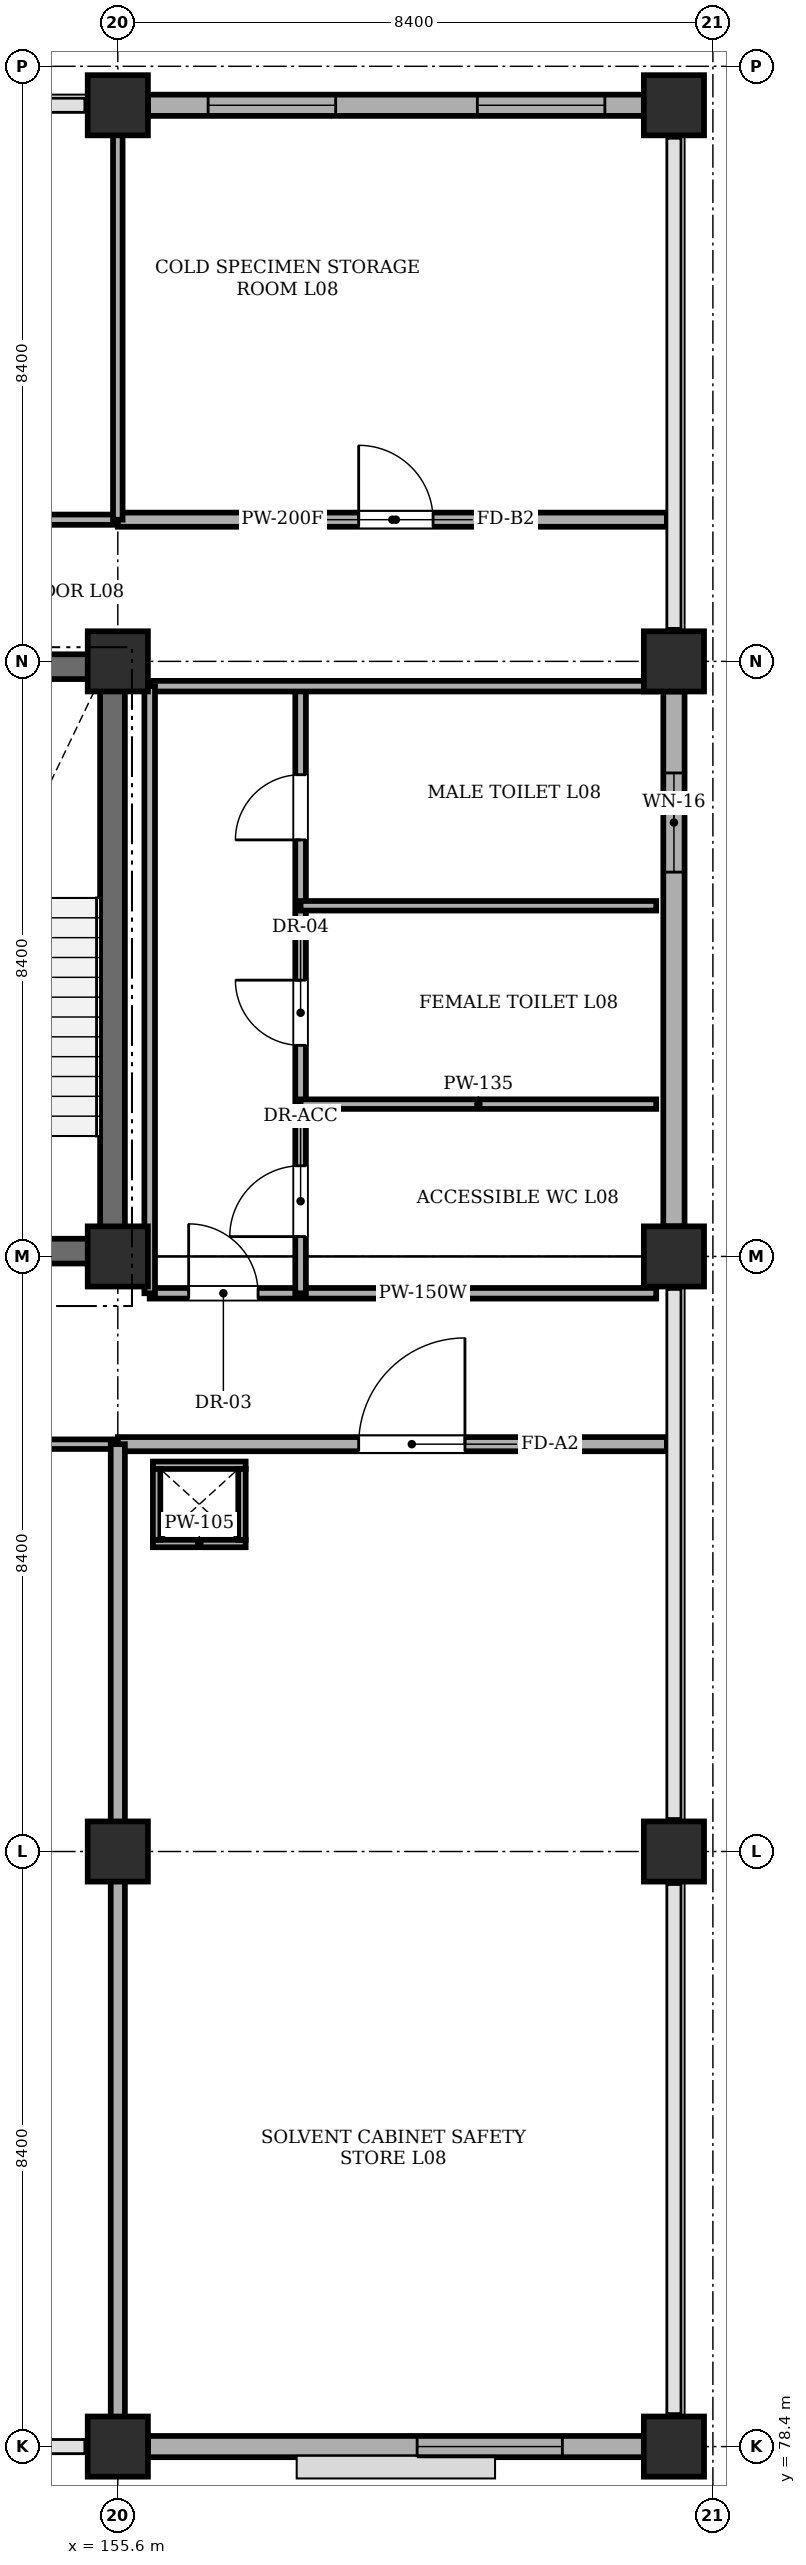
"""IFC4 building model, lengths in metres.
Left out: names, types, materials, properties, quantities, classifications, styles, units other than length and angle.
Written with IfcOpenShell. Run it as: python <this file> out.ifc"""

import sys

from ifc_helpers import new_model, si_unit, direction, frame, frame_2d, origin, origin_2d, place, context, subcontext, project, spatial, rectangle, extrude, element, fill, save


model = new_model("IFC4")
c1 = context("Model", 3, precision=1e-05, world=origin(), true_north=direction((0.0, 1.0)))
c2 = subcontext(c1, "Body", "Model", "MODEL_VIEW")
j1 = project(units=[si_unit("LENGTHUNIT", "METRE"), si_unit("PLANEANGLEUNIT", "RADIAN")], contexts=[c1])
p1 = place(None, origin())
s1 = spatial("IfcSite", under=j1, at=p1, CompositionType="ELEMENT")
p2 = place(p1, origin())
s2 = spatial("IfcBuilding", under=s1, at=p2, CompositionType="ELEMENT")
p3 = place(p2, frame((0.0, 0.0, 31.8)))
s3 = spatial("IfcBuildingStorey", under=s2, at=p3, CompositionType="ELEMENT", Elevation=31.8)
for number, where, z_axis, x_axis in (
    (1, (155.6, 78.4, 0.0), (0.0, 0.0, 1.0), (1.0, 0.0, 0.0)),
    (2, (155.6, 86.8, 0.0), (0.0, 0.0, 1.0), (1.0, 0.0, 0.0)),
    (3, (155.6, 95.2, 0.0), (0.0, 0.0, 1.0), (1.0, 0.0, 0.0)),
    (4, (155.6, 103.6, 0.0), (0.0, 0.0, 1.0), (1.0, 0.0, 0.0)),
    (5, (155.6, 111.45, 0.0), (0.0, 0.0, 1.0), (1.0, 0.0, 0.0)),
    (6, (163.45, 78.4, 0.0), (0.0, 0.0, 1.0), (1.0, 0.0, 0.0)),
    (7, (163.45, 86.8, 0.0), (0.0, 0.0, 1.0), (1.0, 0.0, 0.0)),
    (8, (163.45, 95.2, 0.0), (0.0, 0.0, 1.0), (1.0, 0.0, 0.0)),
    (9, (163.45, 103.6, 0.0), (0.0, 0.0, 1.0), (1.0, 0.0, 0.0)),
    (10, (163.45, 111.45, 0.0), (0.0, 0.0, 1.0), (1.0, 0.0, 0.0)),
):
    element("IfcColumn", number, at=place(p3, frame(where, z_axis=z_axis, x_axis=x_axis)), inside=s3, PredefinedType="COLUMN", context=c2, shape_type="SweptSolid", body=[
        extrude(rectangle(XDim=0.85, YDim=0.85, at=origin_2d()), origin(), (0.0, 0.0, 1.0), 4.02),
    ])
for number, where, z_axis, x_axis in (
    (11, (151.9, 95.275, 0.0), (0.0, 0.0, 1.0), (1.0, 0.0, 0.0)),
    (12, (151.9, 103.525, 0.0), (0.0, 0.0, 1.0), (1.0, 0.0, 0.0)),
):
    element("IfcWall", number, at=place(p3, frame(where, z_axis=z_axis, x_axis=x_axis)), inside=s3, PredefinedType="SHEAR", context=c2, shape_type="SweptSolid", body=[
        extrude(rectangle(XDim=3.8, YDim=0.35, at=frame_2d((1.9, 0.0))), origin(), (0.0, 0.0, 1.0), 4.02),
    ])
p4 = place(p3, frame((155.525, 95.45, 0.0), z_axis=(0.0, 0.0, 1.0), x_axis=(0.0, 1.0, 0.0)))
e13 = element("IfcWall", 13, at=p4, inside=s3, PredefinedType="SHEAR", context=c2, shape_type="SweptSolid", body=[
    extrude(rectangle(XDim=7.9, YDim=0.35, at=frame_2d((3.95, 0.0))), origin(), (0.0, 0.0, 1.0), 4.02),
])
p5 = place(p3, frame((156.025, 111.45, 0.0), z_axis=(0.0, 0.0, 1.0), x_axis=(1.0, 0.0, 0.0)))
e14 = element("IfcWall", 14, at=p5, inside=s3, PredefinedType="STANDARD", context=c2, shape_type="SweptSolid", body=[
    extrude(rectangle(XDim=7.0, YDim=0.3, at=frame_2d((3.5, 0.0))), origin(), (0.0, 0.0, 1.0), 3.32),
])
p6 = place(p5, frame((0.85, 0.0, 0.9)))
e15 = element("IfcOpeningElement", 15, at=p6, cuts=e14, PredefinedType="OPENING", context=c2, shape_type="SweptSolid", body=[
    extrude(rectangle(XDim=1.8, YDim=2.1, at=frame_2d((0.9, 1.05))), frame((0.0, 0.16, 0.0), z_axis=(0.0, -1.0, 0.0), x_axis=(1.0, 0.0, 0.0)), (0.0, 0.0, 1.0), 0.32),
])
p7 = place(p5, frame((4.65, 0.0, 0.9)))
e16 = element("IfcOpeningElement", 16, at=p7, cuts=e14, PredefinedType="OPENING", context=c2, shape_type="SweptSolid", body=[
    extrude(rectangle(XDim=1.8, YDim=2.1, at=frame_2d((0.9, 1.05))), frame((0.0, 0.16, 0.0), z_axis=(0.0, -1.0, 0.0), x_axis=(1.0, 0.0, 0.0)), (0.0, 0.0, 1.0), 0.32),
])
p8 = place(p3, frame((163.025, 78.4, 0.0), z_axis=(0.0, 0.0, 1.0), x_axis=(-1.0, 0.0, 0.0)))
e17 = element("IfcWall", 17, at=p8, inside=s3, PredefinedType="STANDARD", context=c2, shape_type="SweptSolid", body=[
    extrude(rectangle(XDim=7.0, YDim=0.3, at=frame_2d((3.5, 0.0))), origin(), (0.0, 0.0, 1.0), 3.32),
])
p9 = place(p8, frame((1.15, 0.0, 0.95)))
e18 = element("IfcOpeningElement", 18, at=p9, cuts=e17, PredefinedType="OPENING", context=c2, shape_type="SweptSolid", body=[
    extrude(rectangle(XDim=2.05, YDim=2.05, at=frame_2d((1.025, 1.025))), frame((0.0, 0.16, 0.0), z_axis=(0.0, -1.0, 0.0), x_axis=(1.0, 0.0, 0.0)), (0.0, 0.0, 1.0), 0.32),
])
p10 = place(p3, frame((163.45, 103.175, 0.0), z_axis=(0.0, 0.0, 1.0), x_axis=(0.0, -1.0, 0.0)))
e19 = element("IfcWall", 19, at=p10, inside=s3, PredefinedType="STANDARD", context=c2, shape_type="SweptSolid", body=[
    extrude(rectangle(XDim=7.55, YDim=0.3, at=frame_2d((3.775, 0.0))), origin(), (0.0, 0.0, 1.0), 3.32),
])
p11 = place(p10, frame((1.15, 0.0, 1.1)))
e20 = element("IfcOpeningElement", 20, at=p11, cuts=e19, PredefinedType="OPENING", context=c2, shape_type="SweptSolid", body=[
    extrude(rectangle(XDim=1.4, YDim=1.4, at=frame_2d((0.7, 0.7))), frame((0.0, 0.16, 0.0), z_axis=(0.0, -1.0, 0.0), x_axis=(1.0, 0.0, 0.0)), (0.0, 0.0, 1.0), 0.32),
])
p12 = place(p3, frame((156.05, 94.68, 0.0), z_axis=(0.0, 0.0, 1.0), x_axis=(1.0, 0.0, 0.0)))
e21 = element("IfcWall", 21, at=p12, inside=s3, PredefinedType="PARTITIONING", context=c2, shape_type="SweptSolid", body=[
    extrude(rectangle(XDim=7.15, YDim=0.15, at=frame_2d((3.575, 0.0))), origin(), (0.0, 0.0, 1.0), 4.02),
])
p13 = place(p12, frame((0.55, 0.0, 0.0)))
e22 = element("IfcOpeningElement", 22, at=p13, cuts=e21, PredefinedType="OPENING", context=c2, shape_type="SweptSolid", body=[
    extrude(rectangle(XDim=0.98, YDim=2.12, at=frame_2d((0.49, 1.06))), frame((0.0, 0.085, 0.0), z_axis=(0.0, -1.0, 0.0), x_axis=(1.0, 0.0, 0.0)), (0.0, 0.0, 1.0), 0.17),
])
p14 = place(p3, frame((158.18, 94.68, 0.0), z_axis=(0.0, 0.0, 1.0), x_axis=(0.0, 1.0, 0.0)))
e23 = element("IfcWall", 23, at=p14, inside=s3, PredefinedType="PARTITIONING", context=c2, shape_type="SweptSolid", body=[
    extrude(rectangle(XDim=8.57, YDim=0.15, at=frame_2d((4.285, 0.0))), origin(), (0.0, 0.0, 1.0), 4.02),
])
p15 = place(p14, frame((0.8, 0.0, 0.0)))
e24 = element("IfcOpeningElement", 24, at=p15, cuts=e23, PredefinedType="OPENING", context=c2, shape_type="SweptSolid", body=[
    extrude(rectangle(XDim=1.0, YDim=2.12, at=frame_2d((0.5, 1.06))), frame((0.0, 0.085, 0.0), z_axis=(0.0, -1.0, 0.0), x_axis=(1.0, 0.0, 0.0)), (0.0, 0.0, 1.0), 0.17),
])
p16 = place(p14, frame((3.5, 0.0, 0.0)))
e25 = element("IfcOpeningElement", 25, at=p16, cuts=e23, PredefinedType="OPENING", context=c2, shape_type="SweptSolid", body=[
    extrude(rectangle(XDim=0.92, YDim=2.1, at=frame_2d((0.46, 1.05))), frame((0.0, 0.085, 0.0), z_axis=(0.0, -1.0, 0.0), x_axis=(1.0, 0.0, 0.0)), (0.0, 0.0, 1.0), 0.17),
])
p17 = place(p14, frame((6.4, 0.0, 0.0)))
e26 = element("IfcOpeningElement", 26, at=p17, cuts=e23, PredefinedType="OPENING", context=c2, shape_type="SweptSolid", body=[
    extrude(rectangle(XDim=0.92, YDim=2.1, at=frame_2d((0.46, 1.05))), frame((0.0, 0.085, 0.0), z_axis=(0.0, -1.0, 0.0), x_axis=(1.0, 0.0, 0.0)), (0.0, 0.0, 1.0), 0.17),
])
for number, where, z_axis, x_axis in (
    (27, (158.18, 97.35, 0.0), (0.0, 0.0, 1.0), (1.0, 0.0, 0.0)),
    (28, (158.18, 100.15, 0.0), (0.0, 0.0, 1.0), (1.0, 0.0, 0.0)),
):
    element("IfcWall", number, at=place(p3, frame(where, z_axis=z_axis, x_axis=x_axis)), inside=s3, PredefinedType="PARTITIONING", context=c2, shape_type="SweptSolid", body=[
        extrude(rectangle(XDim=5.02, YDim=0.135, at=frame_2d((2.51, 0.0))), origin(), (0.0, 0.0, 1.0), 4.02),
    ])
p18 = place(p3, frame((156.05, 103.25, 0.0), z_axis=(0.0, 0.0, 1.0), x_axis=(1.0, 0.0, 0.0)))
e29 = element("IfcWall", 29, at=p18, inside=s3, PredefinedType="PARTITIONING", context=c2, shape_type="SweptSolid", body=[
    extrude(rectangle(XDim=7.15, YDim=0.15, at=frame_2d((3.575, 0.0))), origin(), (0.0, 0.0, 1.0), 4.02),
])
p19 = place(p3, frame((156.05, 94.68, 0.0), z_axis=(0.0, 0.0, 1.0), x_axis=(0.0, 1.0, 0.0)))
e30 = element("IfcWall", 30, at=p19, inside=s3, PredefinedType="PARTITIONING", context=c2, shape_type="SweptSolid", body=[
    extrude(rectangle(XDim=8.57, YDim=0.15, at=frame_2d((4.285, 0.0))), origin(), (0.0, 0.0, 1.0), 4.02),
])
p20 = place(p3, frame((138.8, 105.6, 0.0), z_axis=(0.0, 0.0, 1.0), x_axis=(1.0, 0.0, 0.0)))
e31 = element("IfcWall", 31, at=p20, inside=s3, PredefinedType="PARTITIONING", context=c2, shape_type="SweptSolid", body=[
    extrude(rectangle(XDim=16.8, YDim=0.145, at=frame_2d((8.4, 0.0))), origin(), (0.0, 0.0, 1.0), 4.02),
])
p21 = place(p20, frame((3.4, 0.0, 0.0)))
e32 = element("IfcOpeningElement", 32, at=p21, cuts=e31, PredefinedType="OPENING", context=c2, shape_type="SweptSolid", body=[
    extrude(rectangle(XDim=1.6, YDim=2.24, at=frame_2d((0.8, 1.12))), frame((0.0, 0.083, 0.0), z_axis=(0.0, -1.0, 0.0), x_axis=(1.0, 0.0, 0.0)), (0.0, 0.0, 1.0), 0.165),
])
p22 = place(p3, frame((155.6, 105.6, 0.0), z_axis=(0.0, 0.0, 1.0), x_axis=(1.0, 0.0, 0.0)))
e33 = element("IfcWall", 33, at=p22, inside=s3, PredefinedType="SOLIDWALL", context=c2, shape_type="SweptSolid", body=[
    extrude(rectangle(XDim=7.75, YDim=0.2, at=frame_2d((3.875, 0.0))), origin(), (0.0, 0.0, 1.0), 4.02),
])
p23 = place(p22, frame((3.4, 0.0, 0.0)))
e34 = element("IfcOpeningElement", 34, at=p23, cuts=e33, PredefinedType="OPENING", context=c2, shape_type="SweptSolid", body=[
    extrude(rectangle(XDim=1.05, YDim=2.15, at=frame_2d((0.525, 1.075))), frame((0.0, 0.11, 0.0), z_axis=(0.0, -1.0, 0.0), x_axis=(1.0, 0.0, 0.0)), (0.0, 0.0, 1.0), 0.22),
])
p24 = place(p3, frame((155.6, 105.6, 0.0), z_axis=(0.0, 0.0, 1.0), x_axis=(0.0, 1.0, 0.0)))
e35 = element("IfcWall", 35, at=p24, inside=s3, PredefinedType="PARTITIONING", context=c2, shape_type="SweptSolid", body=[
    extrude(rectangle(XDim=5.75, YDim=0.135, at=frame_2d((2.875, 0.0))), origin(), (0.0, 0.0, 1.0), 3.32),
])
p25 = place(p3, frame((143.0, 92.55, 0.0), z_axis=(0.0, 0.0, 1.0), x_axis=(1.0, 0.0, 0.0)))
e36 = element("IfcWall", 36, at=p25, inside=s3, PredefinedType="PARTITIONING", context=c2, shape_type="SweptSolid", body=[
    extrude(rectangle(XDim=12.6, YDim=0.135, at=frame_2d((6.3, 0.0))), origin(), (0.0, 0.0, 1.0), 4.02),
])
p26 = place(p25, frame((6.8, 0.0, 0.0)))
e37 = element("IfcOpeningElement", 37, at=p26, cuts=e36, PredefinedType="OPENING", context=c2, shape_type="SweptSolid", body=[
    extrude(rectangle(XDim=1.08, YDim=2.15, at=frame_2d((0.54, 1.075))), frame((0.0, 0.077, 0.0), z_axis=(0.0, -1.0, 0.0), x_axis=(1.0, 0.0, 0.0)), (0.0, 0.0, 1.0), 0.155),
])
p27 = place(p3, frame((155.6, 92.55, 0.0), z_axis=(0.0, 0.0, 1.0), x_axis=(1.0, 0.0, 0.0)))
e38 = element("IfcWall", 38, at=p27, inside=s3, PredefinedType="SOLIDWALL", context=c2, shape_type="SweptSolid", body=[
    extrude(rectangle(XDim=7.75, YDim=0.2, at=frame_2d((3.875, 0.0))), origin(), (0.0, 0.0, 1.0), 4.02),
])
p28 = place(p27, frame((3.4, 0.0, 0.0)))
e39 = element("IfcOpeningElement", 39, at=p28, cuts=e38, PredefinedType="OPENING", context=c2, shape_type="SweptSolid", body=[
    extrude(rectangle(XDim=1.5, YDim=2.2, at=frame_2d((0.75, 1.1))), frame((0.0, 0.11, 0.0), z_axis=(0.0, -1.0, 0.0), x_axis=(1.0, 0.0, 0.0)), (0.0, 0.0, 1.0), 0.22),
])
p29 = place(p3, frame((155.6, 78.55, 0.0), z_axis=(0.0, 0.0, 1.0), x_axis=(0.0, 1.0, 0.0)))
e40 = element("IfcWall", 40, at=p29, inside=s3, PredefinedType="SOLIDWALL", context=c2, shape_type="SweptSolid", body=[
    extrude(rectangle(XDim=14.0, YDim=0.2, at=frame_2d((7.0, 0.0))), origin(), (0.0, 0.0, 1.0), 3.32),
])
for number, where, z_axis, x_axis in (
    (41, (156.095, 91.147, 0.0), (0.0, 0.0, 1.0), (1.0, 0.0, 0.0)),
    (42, (156.095, 92.252, 0.0), (0.0, 0.0, 1.0), (1.0, 0.0, 0.0)),
):
    element("IfcWall", number, at=place(p3, frame(where, z_axis=z_axis, x_axis=x_axis)), inside=s3, PredefinedType="PARTITIONING", context=c2, shape_type="SweptSolid", body=[
        extrude(rectangle(XDim=1.31, YDim=0.105, at=frame_2d((0.655, 0.0))), origin(), (0.0, 0.0, 1.0), 4.02),
    ])
for number, where, z_axis, x_axis in (
    (43, (156.147, 91.2, 0.0), (0.0, 0.0, 1.0), (0.0, 1.0, 0.0)),
    (44, (157.353, 91.2, 0.0), (0.0, 0.0, 1.0), (0.0, 1.0, 0.0)),
):
    element("IfcWall", number, at=place(p3, frame(where, z_axis=z_axis, x_axis=x_axis)), inside=s3, PredefinedType="PARTITIONING", context=c2, shape_type="SweptSolid", body=[
        extrude(rectangle(XDim=1.0, YDim=0.105, at=frame_2d((0.5, 0.0))), origin(), (0.0, 0.0, 1.0), 4.02),
    ])
p30 = place(p6, origin())
e45 = element("IfcWindow", 45, at=p30, inside=s3, PartitioningType="DOUBLE_PANEL_VERTICAL", PredefinedType="WINDOW", context=c2, shape_type="SweptSolid", body=[
    extrude(rectangle(XDim=1.8, YDim=2.1, at=frame_2d((0.9, 1.05))), frame((0.0, 0.03, 0.0), z_axis=(0.0, -1.0, 0.0), x_axis=(1.0, 0.0, 0.0)), (0.0, 0.0, 1.0), 0.06),
])
fill(e15, e45)
p31 = place(p7, origin())
e46 = element("IfcWindow", 46, at=p31, inside=s3, PartitioningType="DOUBLE_PANEL_VERTICAL", PredefinedType="WINDOW", context=c2, shape_type="SweptSolid", body=[
    extrude(rectangle(XDim=1.8, YDim=2.1, at=frame_2d((0.9, 1.05))), frame((0.0, 0.03, 0.0), z_axis=(0.0, -1.0, 0.0), x_axis=(1.0, 0.0, 0.0)), (0.0, 0.0, 1.0), 0.06),
])
fill(e16, e46)
p32 = place(p9, origin())
e47 = element("IfcWindow", 47, at=p32, inside=s3, PartitioningType="DOUBLE_PANEL_VERTICAL", PredefinedType="WINDOW", context=c2, shape_type="SweptSolid", body=[
    extrude(rectangle(XDim=2.05, YDim=2.05, at=frame_2d((1.025, 1.025))), frame((0.0, 0.03, 0.0), z_axis=(0.0, -1.0, 0.0), x_axis=(1.0, 0.0, 0.0)), (0.0, 0.0, 1.0), 0.06),
])
fill(e18, e47)
p33 = place(p11, origin())
e48 = element("IfcWindow", 48, at=p33, inside=s3, PartitioningType="SINGLE_PANEL", PredefinedType="WINDOW", context=c2, shape_type="SweptSolid", body=[
    extrude(rectangle(XDim=1.4, YDim=1.4, at=frame_2d((0.7, 0.7))), frame((0.0, 0.03, 0.0), z_axis=(0.0, -1.0, 0.0), x_axis=(1.0, 0.0, 0.0)), (0.0, 0.0, 1.0), 0.06),
])
fill(e20, e48)
p34 = place(p13, origin())
e49 = element("IfcDoor", 49, at=p34, inside=s3, OperationType="SINGLE_SWING_LEFT", PredefinedType="DOOR", context=c2, shape_type="SweptSolid", body=[
    extrude(rectangle(XDim=0.98, YDim=2.12, at=frame_2d((0.49, 1.06))), frame((0.0, 0.025, 0.0), z_axis=(0.0, -1.0, 0.0), x_axis=(1.0, 0.0, 0.0)), (0.0, 0.0, 1.0), 0.05),
])
fill(e22, e49)
p35 = place(p15, origin())
e50 = element("IfcDoor", 50, at=p35, inside=s3, OperationType="SINGLE_SWING_LEFT", PredefinedType="DOOR", context=c2, shape_type="SweptSolid", body=[
    extrude(rectangle(XDim=1.0, YDim=2.12, at=frame_2d((0.5, 1.06))), frame((0.0, 0.025, 0.0), z_axis=(0.0, -1.0, 0.0), x_axis=(1.0, 0.0, 0.0)), (0.0, 0.0, 1.0), 0.05),
])
fill(e24, e50)
p36 = place(p16, origin())
e51 = element("IfcDoor", 51, at=p36, inside=s3, OperationType="SINGLE_SWING_RIGHT", PredefinedType="DOOR", context=c2, shape_type="SweptSolid", body=[
    extrude(rectangle(XDim=0.92, YDim=2.1, at=frame_2d((0.46, 1.05))), frame((0.0, 0.025, 0.0), z_axis=(0.0, -1.0, 0.0), x_axis=(1.0, 0.0, 0.0)), (0.0, 0.0, 1.0), 0.05),
])
fill(e25, e51)
p37 = place(p17, origin())
e52 = element("IfcDoor", 52, at=p37, inside=s3, OperationType="SINGLE_SWING_LEFT", PredefinedType="DOOR", context=c2, shape_type="SweptSolid", body=[
    extrude(rectangle(XDim=0.92, YDim=2.1, at=frame_2d((0.46, 1.05))), frame((0.0, 0.025, 0.0), z_axis=(0.0, -1.0, 0.0), x_axis=(1.0, 0.0, 0.0)), (0.0, 0.0, 1.0), 0.05),
])
fill(e26, e52)
p38 = place(p23, origin())
e53 = element("IfcDoor", 53, at=p38, inside=s3, OperationType="SINGLE_SWING_LEFT", PredefinedType="DOOR", context=c2, shape_type="SweptSolid", body=[
    extrude(rectangle(XDim=1.05, YDim=2.15, at=frame_2d((0.525, 1.075))), frame((0.0, 0.025, 0.0), z_axis=(0.0, -1.0, 0.0), x_axis=(1.0, 0.0, 0.0)), (0.0, 0.0, 1.0), 0.05),
])
fill(e34, e53)
p39 = place(p28, origin())
e54 = element("IfcDoor", 54, at=p39, inside=s3, OperationType="SINGLE_SWING_RIGHT", PredefinedType="DOOR", context=c2, shape_type="SweptSolid", body=[
    extrude(rectangle(XDim=1.5, YDim=2.2, at=frame_2d((0.75, 1.1))), frame((0.0, 0.025, 0.0), z_axis=(0.0, -1.0, 0.0), x_axis=(1.0, 0.0, 0.0)), (0.0, 0.0, 1.0), 0.05),
])
fill(e39, e54)
save(model, sys.argv[1])
